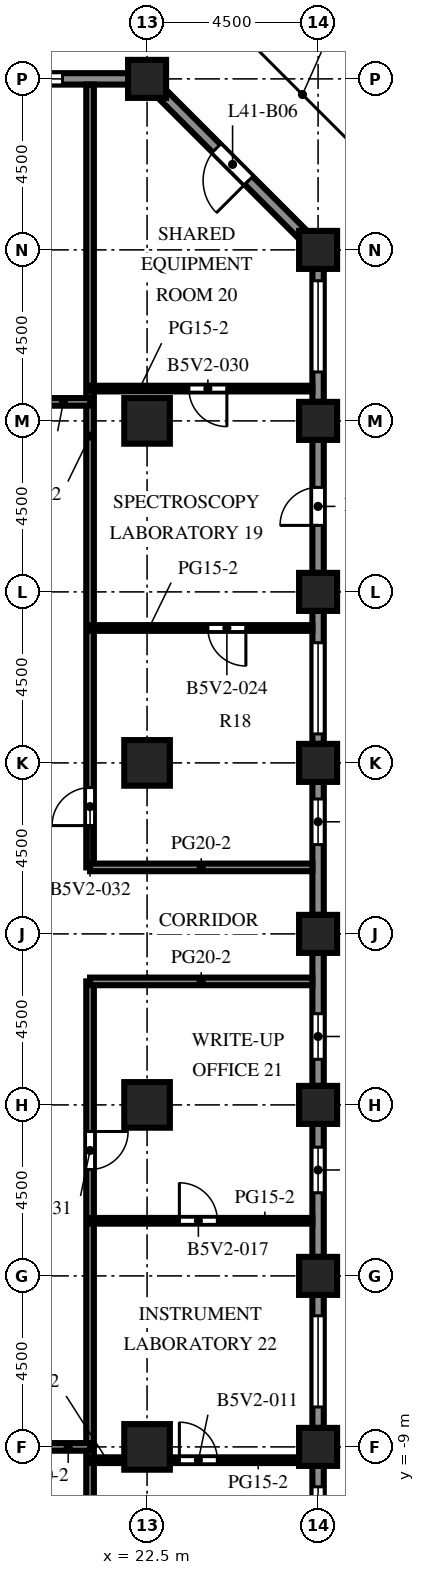
"""IFC4 building model, lengths in metres.
Left out: names, types, materials, properties, quantities, classifications, styles, units other than length and angle.
Written with IfcOpenShell. Run it as: python <this file> out.ifc"""

import sys

from ifc_helpers import new_model, si_unit, direction, frame, frame_2d, origin, origin_2d, place, context, subcontext, project, spatial, rectangle, extrude, element, fill, save


model = new_model("IFC4")
c1 = context("Model", 3, precision=1e-05, world=origin(), true_north=direction((0.0, 1.0)))
c2 = subcontext(c1, "Body", "Model", "MODEL_VIEW")
j1 = project(units=[si_unit("LENGTHUNIT", "METRE"), si_unit("PLANEANGLEUNIT", "RADIAN")], contexts=[c1])
p1 = place(None, origin())
s1 = spatial("IfcSite", under=j1, at=p1, CompositionType="ELEMENT")
p2 = place(p1, origin())
s2 = spatial("IfcBuilding", under=s1, at=p2, CompositionType="ELEMENT")
p3 = place(p2, frame((0.0, 0.0, 181.4)))
s3 = spatial("IfcBuildingStorey", under=s2, at=p3, CompositionType="ELEMENT", Elevation=181.4)
for number, where, z_axis, x_axis in (
    (1, (22.5, 27.0, 0.0), (0.0, 0.0, 1.0), (1.0, 0.0, 0.0)),
    (2, (27.0, -9.0, 0.0), (0.0, 0.0, 1.0), (1.0, 0.0, 0.0)),
    (3, (27.0, -4.5, 0.0), (0.0, 0.0, 1.0), (1.0, 0.0, 0.0)),
    (4, (27.0, 0.0, 0.0), (0.0, 0.0, 1.0), (1.0, 0.0, 0.0)),
    (5, (27.0, 4.5, 0.0), (0.0, 0.0, 1.0), (1.0, 0.0, 0.0)),
    (6, (27.0, 9.0, 0.0), (0.0, 0.0, 1.0), (1.0, 0.0, 0.0)),
    (7, (27.0, 13.5, 0.0), (0.0, 0.0, 1.0), (1.0, 0.0, 0.0)),
    (8, (27.0, 18.0, 0.0), (0.0, 0.0, 1.0), (1.0, 0.0, 0.0)),
    (9, (27.0, 22.5, 0.0), (0.0, 0.0, 1.0), (1.0, 0.0, 0.0)),
):
    element("IfcColumn", number, at=place(p3, frame(where, z_axis=z_axis, x_axis=x_axis)), inside=s3, PredefinedType="COLUMN", context=c2, shape_type="SweptSolid", body=[
        extrude(rectangle(XDim=1.0, YDim=1.0, at=origin_2d()), origin(), (0.0, 0.0, 1.0), 4.1),
    ])
for number, where, z_axis, x_axis in (
    (10, (22.5, -9.0, 0.0), (0.0, 0.0, 1.0), (1.0, 0.0, 0.0)),
    (11, (22.5, 0.0, 0.0), (0.0, 0.0, 1.0), (1.0, 0.0, 0.0)),
    (12, (22.5, 9.0, 0.0), (0.0, 0.0, 1.0), (1.0, 0.0, 0.0)),
    (13, (22.5, 18.0, 0.0), (0.0, 0.0, 1.0), (1.0, 0.0, 0.0)),
):
    element("IfcColumn", number, at=place(p3, frame(where, z_axis=z_axis, x_axis=x_axis)), inside=s3, PredefinedType="COLUMN", context=c2, shape_type="SweptSolid", body=[
        extrude(rectangle(XDim=1.2, YDim=1.2, at=origin_2d()), origin(), (0.0, 0.0, 1.0), 4.1),
    ])
p4 = place(p3, frame((27.0, -9.5, 0.0), z_axis=(0.0, 0.0, 1.0), x_axis=(0.0, -1.0, 0.0)))
e14 = element("IfcWall", 14, at=p4, inside=s3, PredefinedType="SOLIDWALL", context=c2, shape_type="SweptSolid", body=[
    extrude(rectangle(XDim=3.5, YDim=0.3, at=frame_2d((1.75, 0.0))), origin(), (0.0, 0.0, 1.0), 2.7),
])
p5 = place(p4, frame((0.55, 0.0, 0.8)))
e15 = element("IfcOpeningElement", 15, at=p5, cuts=e14, PredefinedType="OPENING", context=c2, shape_type="SweptSolid", body=[
    extrude(rectangle(XDim=2.4, YDim=1.7, at=frame_2d((1.2, 0.85))), frame((0.0, 0.16, 0.0), z_axis=(0.0, -1.0, 0.0), x_axis=(1.0, 0.0, 0.0)), (0.0, 0.0, 1.0), 0.32),
])
p6 = place(p3, frame((27.0, -5.0, 0.0), z_axis=(0.0, 0.0, 1.0), x_axis=(0.0, -1.0, 0.0)))
e16 = element("IfcWall", 16, at=p6, inside=s3, PredefinedType="SOLIDWALL", context=c2, shape_type="SweptSolid", body=[
    extrude(rectangle(XDim=3.5, YDim=0.3, at=frame_2d((1.75, 0.0))), origin(), (0.0, 0.0, 1.0), 2.7),
])
p7 = place(p6, frame((0.55, 0.0, 0.8)))
e17 = element("IfcOpeningElement", 17, at=p7, cuts=e16, PredefinedType="OPENING", context=c2, shape_type="SweptSolid", body=[
    extrude(rectangle(XDim=2.4, YDim=1.7, at=frame_2d((1.2, 0.85))), frame((0.0, 0.16, 0.0), z_axis=(0.0, -1.0, 0.0), x_axis=(1.0, 0.0, 0.0)), (0.0, 0.0, 1.0), 0.32),
])
p8 = place(p3, frame((27.0, -0.5, 0.0), z_axis=(0.0, 0.0, 1.0), x_axis=(0.0, -1.0, 0.0)))
e18 = element("IfcWall", 18, at=p8, inside=s3, PredefinedType="SOLIDWALL", context=c2, shape_type="SweptSolid", body=[
    extrude(rectangle(XDim=3.5, YDim=0.3, at=frame_2d((1.75, 0.0))), origin(), (0.0, 0.0, 1.0), 2.7),
])
p9 = place(p8, frame((0.613, 0.0, 0.8)))
e19 = element("IfcOpeningElement", 19, at=p9, cuts=e18, PredefinedType="OPENING", context=c2, shape_type="SweptSolid", body=[
    extrude(rectangle(XDim=1.2, YDim=1.7, at=frame_2d((0.6, 0.85))), frame((0.0, 0.16, 0.0), z_axis=(0.0, -1.0, 0.0), x_axis=(1.0, 0.0, 0.0)), (0.0, 0.0, 1.0), 0.32),
])
p10 = place(p3, frame((27.0, 4.0, 0.0), z_axis=(0.0, 0.0, 1.0), x_axis=(0.0, -1.0, 0.0)))
e20 = element("IfcWall", 20, at=p10, inside=s3, PredefinedType="SOLIDWALL", context=c2, shape_type="SweptSolid", body=[
    extrude(rectangle(XDim=3.5, YDim=0.3, at=frame_2d((1.75, 0.0))), origin(), (0.0, 0.0, 1.0), 2.7),
])
p11 = place(p10, frame((1.6, 0.0, 0.8)))
e21 = element("IfcOpeningElement", 21, at=p11, cuts=e20, PredefinedType="OPENING", context=c2, shape_type="SweptSolid", body=[
    extrude(rectangle(XDim=1.2, YDim=1.7, at=frame_2d((0.6, 0.85))), frame((0.0, 0.16, 0.0), z_axis=(0.0, -1.0, 0.0), x_axis=(1.0, 0.0, 0.0)), (0.0, 0.0, 1.0), 0.32),
])
p12 = place(p3, frame((27.0, 8.5, 0.0), z_axis=(0.0, 0.0, 1.0), x_axis=(0.0, -1.0, 0.0)))
e22 = element("IfcWall", 22, at=p12, inside=s3, PredefinedType="SOLIDWALL", context=c2, shape_type="SweptSolid", body=[
    extrude(rectangle(XDim=3.5, YDim=0.3, at=frame_2d((1.75, 0.0))), origin(), (0.0, 0.0, 1.0), 2.7),
])
p13 = place(p12, frame((0.45, 0.0, 0.8)))
e23 = element("IfcOpeningElement", 23, at=p13, cuts=e22, PredefinedType="OPENING", context=c2, shape_type="SweptSolid", body=[
    extrude(rectangle(XDim=1.2, YDim=1.7, at=frame_2d((0.6, 0.85))), frame((0.0, 0.16, 0.0), z_axis=(0.0, -1.0, 0.0), x_axis=(1.0, 0.0, 0.0)), (0.0, 0.0, 1.0), 0.32),
])
p14 = place(p3, frame((27.0, 13.0, 0.0), z_axis=(0.0, 0.0, 1.0), x_axis=(0.0, -1.0, 0.0)))
e24 = element("IfcWall", 24, at=p14, inside=s3, PredefinedType="SOLIDWALL", context=c2, shape_type="SweptSolid", body=[
    extrude(rectangle(XDim=3.5, YDim=0.3, at=frame_2d((1.75, 0.0))), origin(), (0.0, 0.0, 1.0), 2.7),
])
p15 = place(p14, frame((0.837, 0.0, 0.8)))
e25 = element("IfcOpeningElement", 25, at=p15, cuts=e24, PredefinedType="OPENING", context=c2, shape_type="SweptSolid", body=[
    extrude(rectangle(XDim=2.4, YDim=1.7, at=frame_2d((1.2, 0.85))), frame((0.0, 0.16, 0.0), z_axis=(0.0, -1.0, 0.0), x_axis=(1.0, 0.0, 0.0)), (0.0, 0.0, 1.0), 0.32),
])
p16 = place(p3, frame((27.0, 17.5, 0.0), z_axis=(0.0, 0.0, 1.0), x_axis=(0.0, -1.0, 0.0)))
e26 = element("IfcWall", 26, at=p16, inside=s3, PredefinedType="SOLIDWALL", context=c2, shape_type="SweptSolid", body=[
    extrude(rectangle(XDim=3.5, YDim=0.3, at=frame_2d((1.75, 0.0))), origin(), (0.0, 0.0, 1.0), 2.7),
])
p17 = place(p16, frame((1.25, 0.0, 0.0)))
e27 = element("IfcOpeningElement", 27, at=p17, cuts=e26, PredefinedType="OPENING", context=c2, shape_type="SweptSolid", body=[
    extrude(rectangle(XDim=1.0, YDim=2.2, at=frame_2d((0.5, 1.1))), frame((0.0, 0.16, 0.0), z_axis=(0.0, -1.0, 0.0), x_axis=(1.0, 0.0, 0.0)), (0.0, 0.0, 1.0), 0.32),
])
p18 = place(p3, frame((27.0, 22.0, 0.0), z_axis=(0.0, 0.0, 1.0), x_axis=(0.0, -1.0, 0.0)))
e28 = element("IfcWall", 28, at=p18, inside=s3, PredefinedType="SOLIDWALL", context=c2, shape_type="SweptSolid", body=[
    extrude(rectangle(XDim=3.5, YDim=0.3, at=frame_2d((1.75, 0.0))), origin(), (0.0, 0.0, 1.0), 2.7),
])
p19 = place(p18, frame((0.312, 0.0, 0.8)))
e29 = element("IfcOpeningElement", 29, at=p19, cuts=e28, PredefinedType="OPENING", context=c2, shape_type="SweptSolid", body=[
    extrude(rectangle(XDim=2.4, YDim=1.7, at=frame_2d((1.2, 0.85))), frame((0.0, 0.16, 0.0), z_axis=(0.0, -1.0, 0.0), x_axis=(1.0, 0.0, 0.0)), (0.0, 0.0, 1.0), 0.32),
])
p20 = place(p3, frame((22.894, 26.606, 0.0), z_axis=(0.0, 0.0, 1.0), x_axis=(0.707106781187, -0.707106781187, 0.0)))
e30 = element("IfcWall", 30, at=p20, inside=s3, PredefinedType="SOLIDWALL", context=c2, shape_type="SweptSolid", body=[
    extrude(rectangle(XDim=5.25, YDim=0.3, at=frame_2d((2.625, 0.0))), origin(), (0.0, 0.0, 1.0), 2.7),
])
p21 = place(p20, frame((2.025, 0.0, 0.0)))
e31 = element("IfcOpeningElement", 31, at=p21, cuts=e30, PredefinedType="OPENING", context=c2, shape_type="SweptSolid", body=[
    extrude(rectangle(XDim=1.2, YDim=2.2, at=frame_2d((0.6, 1.1))), frame((0.0, 0.16, 0.0), z_axis=(0.0, -1.0, 0.0), x_axis=(1.0, 0.0, 0.0)), (0.0, 0.0, 1.0), 0.32),
])
p22 = place(p3, frame((18.5, 27.0, 0.0), z_axis=(0.0, 0.0, 1.0), x_axis=(1.0, 0.0, 0.0)))
e32 = element("IfcWall", 32, at=p22, inside=s3, PredefinedType="SOLIDWALL", context=c2, shape_type="SweptSolid", body=[
    extrude(rectangle(XDim=3.5, YDim=0.3, at=frame_2d((1.75, 0.0))), origin(), (0.0, 0.0, 1.0), 2.7),
])
p23 = place(p22, frame((0.575, 0.0, 0.8)))
e33 = element("IfcOpeningElement", 33, at=p23, cuts=e32, PredefinedType="OPENING", context=c2, shape_type="SweptSolid", body=[
    extrude(rectangle(XDim=1.2, YDim=1.7, at=frame_2d((0.6, 0.85))), frame((0.0, 0.16, 0.0), z_axis=(0.0, -1.0, 0.0), x_axis=(1.0, 0.0, 0.0)), (0.0, 0.0, 1.0), 0.32),
])
p24 = place(p3, frame((21.0, 3.25, 0.0), z_axis=(0.0, 0.0, 1.0), x_axis=(0.0, -1.0, 0.0)))
e34 = element("IfcWall", 34, at=p24, inside=s3, PredefinedType="PARTITIONING", context=c2, shape_type="SweptSolid", body=[
    extrude(rectangle(XDim=30.1, YDim=0.2, at=frame_2d((15.05, 0.0))), origin(), (0.0, 0.0, 1.0), 3.5),
])
p25 = place(p24, frame((3.95, 0.0, 0.0)))
e35 = element("IfcOpeningElement", 35, at=p25, cuts=e34, PredefinedType="OPENING", context=c2, shape_type="SweptSolid", body=[
    extrude(rectangle(XDim=1.0, YDim=2.1, at=frame_2d((0.5, 1.05))), frame((0.0, 0.11, 0.0), z_axis=(0.0, -1.0, 0.0), x_axis=(1.0, 0.0, 0.0)), (0.0, 0.0, 1.0), 0.22),
])
p26 = place(p3, frame((21.0, 26.85, 0.0), z_axis=(0.0, 0.0, 1.0), x_axis=(0.0, -1.0, 0.0)))
e36 = element("IfcWall", 36, at=p26, inside=s3, PredefinedType="PARTITIONING", context=c2, shape_type="SweptSolid", body=[
    extrude(rectangle(XDim=20.6, YDim=0.2, at=frame_2d((10.3, 0.0))), origin(), (0.0, 0.0, 1.0), 3.5),
])
p27 = place(p26, frame((18.5, 0.0, 0.0)))
e37 = element("IfcOpeningElement", 37, at=p27, cuts=e36, PredefinedType="OPENING", context=c2, shape_type="SweptSolid", body=[
    extrude(rectangle(XDim=1.0, YDim=2.1, at=frame_2d((0.5, 1.05))), frame((0.0, 0.11, 0.0), z_axis=(0.0, -1.0, 0.0), x_axis=(1.0, 0.0, 0.0)), (0.0, 0.0, 1.0), 0.22),
])
p28 = place(p3, frame((21.0, -9.35, 0.0), z_axis=(0.0, 0.0, 1.0), x_axis=(1.0, 0.0, 0.0)))
e38 = element("IfcWall", 38, at=p28, inside=s3, PredefinedType="PARTITIONING", context=c2, shape_type="SweptSolid", body=[
    extrude(rectangle(XDim=0.9, YDim=0.15, at=frame_2d((0.45, 0.0))), origin(), (0.0, 0.0, 1.0), 3.5),
])
p29 = place(p3, frame((26.5, -9.35, 0.0), z_axis=(0.0, 0.0, 1.0), x_axis=(-1.0, 0.0, 0.0)))
e39 = element("IfcWall", 39, at=p29, inside=s3, PredefinedType="PARTITIONING", context=c2, shape_type="SweptSolid", body=[
    extrude(rectangle(XDim=3.4, YDim=0.15, at=frame_2d((1.7, 0.0))), origin(), (0.0, 0.0, 1.0), 3.5),
])
p30 = place(p29, frame((2.15, 0.0, 0.0)))
e40 = element("IfcOpeningElement", 40, at=p30, cuts=e39, PredefinedType="OPENING", context=c2, shape_type="SweptSolid", body=[
    extrude(rectangle(XDim=1.0, YDim=2.1, at=frame_2d((0.5, 1.05))), frame((0.0, 0.085, 0.0), z_axis=(0.0, -1.0, 0.0), x_axis=(1.0, 0.0, 0.0)), (0.0, 0.0, 1.0), 0.17),
])
p31 = place(p3, frame((21.0, -9.0, 0.0), z_axis=(0.0, 0.0, 1.0), x_axis=(-1.0, 0.0, 0.0)))
e41 = element("IfcWall", 41, at=p31, inside=s3, PredefinedType="PARTITIONING", context=c2, shape_type="SweptSolid", body=[
    extrude(rectangle(XDim=3.0, YDim=0.2, at=frame_2d((1.5, 0.0))), origin(), (0.0, 0.0, 1.0), 3.5),
])
p32 = place(p31, frame((1.15, 0.0, 0.0)))
e42 = element("IfcOpeningElement", 42, at=p32, cuts=e41, PredefinedType="OPENING", context=c2, shape_type="SweptSolid", body=[
    extrude(rectangle(XDim=1.0, YDim=2.1, at=frame_2d((0.5, 1.05))), frame((0.0, 0.11, 0.0), z_axis=(0.0, -1.0, 0.0), x_axis=(1.0, 0.0, 0.0)), (0.0, 0.0, 1.0), 0.22),
])
p33 = place(p3, frame((26.85, -3.05, 0.0), z_axis=(0.0, 0.0, 1.0), x_axis=(-1.0, 0.0, 0.0)))
e43 = element("IfcWall", 43, at=p33, inside=s3, PredefinedType="PARTITIONING", context=c2, shape_type="SweptSolid", body=[
    extrude(rectangle(XDim=5.85, YDim=0.15, at=frame_2d((2.925, 0.0))), origin(), (0.0, 0.0, 1.0), 3.5),
])
p34 = place(p33, frame((2.5, 0.0, 0.0)))
e44 = element("IfcOpeningElement", 44, at=p34, cuts=e43, PredefinedType="OPENING", context=c2, shape_type="SweptSolid", body=[
    extrude(rectangle(XDim=1.0, YDim=2.1, at=frame_2d((0.5, 1.05))), frame((0.0, 0.085, 0.0), z_axis=(0.0, -1.0, 0.0), x_axis=(1.0, 0.0, 0.0)), (0.0, 0.0, 1.0), 0.17),
])
for number, where, z_axis, x_axis in (
    (45, (21.0, 3.25, 0.0), (0.0, 0.0, 1.0), (1.0, 0.0, 0.0)),
    (46, (21.0, 6.25, 0.0), (0.0, 0.0, 1.0), (1.0, 0.0, 0.0)),
):
    element("IfcWall", number, at=place(p3, frame(where, z_axis=z_axis, x_axis=x_axis)), inside=s3, PredefinedType="PARTITIONING", context=c2, shape_type="SweptSolid", body=[
        extrude(rectangle(XDim=5.85, YDim=0.2, at=frame_2d((2.925, 0.0))), origin(), (0.0, 0.0, 1.0), 3.5),
    ])
p35 = place(p3, frame((21.0, 12.55, 0.0), z_axis=(0.0, 0.0, 1.0), x_axis=(1.0, 0.0, 0.0)))
e47 = element("IfcWall", 47, at=p35, inside=s3, PredefinedType="PARTITIONING", context=c2, shape_type="SweptSolid", body=[
    extrude(rectangle(XDim=5.85, YDim=0.15, at=frame_2d((2.925, 0.0))), origin(), (0.0, 0.0, 1.0), 3.5),
])
p36 = place(p35, frame((3.1, 0.0, 0.0)))
e48 = element("IfcOpeningElement", 48, at=p36, cuts=e47, PredefinedType="OPENING", context=c2, shape_type="SweptSolid", body=[
    extrude(rectangle(XDim=1.0, YDim=2.1, at=frame_2d((0.5, 1.05))), frame((0.0, 0.085, 0.0), z_axis=(0.0, -1.0, 0.0), x_axis=(1.0, 0.0, 0.0)), (0.0, 0.0, 1.0), 0.17),
])
p37 = place(p3, frame((18.0, 18.5, 0.0), z_axis=(0.0, 0.0, 1.0), x_axis=(1.0, 0.0, 0.0)))
e49 = element("IfcWall", 49, at=p37, inside=s3, PredefinedType="PARTITIONING", context=c2, shape_type="SweptSolid", body=[
    extrude(rectangle(XDim=3.0, YDim=0.2, at=frame_2d((1.5, 0.0))), origin(), (0.0, 0.0, 1.0), 3.5),
])
p38 = place(p37, frame((0.6, 0.0, 0.0)))
e50 = element("IfcOpeningElement", 50, at=p38, cuts=e49, PredefinedType="OPENING", context=c2, shape_type="SweptSolid", body=[
    extrude(rectangle(XDim=1.0, YDim=2.1, at=frame_2d((0.5, 1.05))), frame((0.0, 0.11, 0.0), z_axis=(0.0, -1.0, 0.0), x_axis=(1.0, 0.0, 0.0)), (0.0, 0.0, 1.0), 0.22),
])
p39 = place(p3, frame((21.0, 18.85, 0.0), z_axis=(0.0, 0.0, 1.0), x_axis=(1.0, 0.0, 0.0)))
e51 = element("IfcWall", 51, at=p39, inside=s3, PredefinedType="PARTITIONING", context=c2, shape_type="SweptSolid", body=[
    extrude(rectangle(XDim=5.85, YDim=0.15, at=frame_2d((2.925, 0.0))), origin(), (0.0, 0.0, 1.0), 3.5),
])
p40 = place(p39, frame((2.6, 0.0, 0.0)))
e52 = element("IfcOpeningElement", 52, at=p40, cuts=e51, PredefinedType="OPENING", context=c2, shape_type="SweptSolid", body=[
    extrude(rectangle(XDim=1.0, YDim=2.1, at=frame_2d((0.5, 1.05))), frame((0.0, 0.085, 0.0), z_axis=(0.0, -1.0, 0.0), x_axis=(1.0, 0.0, 0.0)), (0.0, 0.0, 1.0), 0.17),
])
p41 = place(p5, origin())
e53 = element("IfcWindow", 53, at=p41, inside=s3, PartitioningType="SINGLE_PANEL", PredefinedType="WINDOW", context=c2, shape_type="SweptSolid", body=[
    extrude(rectangle(XDim=2.4, YDim=1.7, at=frame_2d((1.2, 0.85))), frame((0.0, 0.03, 0.0), z_axis=(0.0, -1.0, 0.0), x_axis=(1.0, 0.0, 0.0)), (0.0, 0.0, 1.0), 0.06),
])
fill(e15, e53)
p42 = place(p7, origin())
e54 = element("IfcWindow", 54, at=p42, inside=s3, PartitioningType="SINGLE_PANEL", PredefinedType="WINDOW", context=c2, shape_type="SweptSolid", body=[
    extrude(rectangle(XDim=2.4, YDim=1.7, at=frame_2d((1.2, 0.85))), frame((0.0, 0.03, 0.0), z_axis=(0.0, -1.0, 0.0), x_axis=(1.0, 0.0, 0.0)), (0.0, 0.0, 1.0), 0.06),
])
fill(e17, e54)
p43 = place(p9, origin())
e55 = element("IfcWindow", 55, at=p43, inside=s3, PartitioningType="SINGLE_PANEL", PredefinedType="WINDOW", context=c2, shape_type="SweptSolid", body=[
    extrude(rectangle(XDim=1.2, YDim=1.7, at=frame_2d((0.6, 0.85))), frame((0.0, 0.03, 0.0), z_axis=(0.0, -1.0, 0.0), x_axis=(1.0, 0.0, 0.0)), (0.0, 0.0, 1.0), 0.06),
])
fill(e19, e55)
p44 = place(p11, origin())
e56 = element("IfcWindow", 56, at=p44, inside=s3, PartitioningType="SINGLE_PANEL", PredefinedType="WINDOW", context=c2, shape_type="SweptSolid", body=[
    extrude(rectangle(XDim=1.2, YDim=1.7, at=frame_2d((0.6, 0.85))), frame((0.0, 0.03, 0.0), z_axis=(0.0, -1.0, 0.0), x_axis=(1.0, 0.0, 0.0)), (0.0, 0.0, 1.0), 0.06),
])
fill(e21, e56)
p45 = place(p13, origin())
e57 = element("IfcWindow", 57, at=p45, inside=s3, PartitioningType="SINGLE_PANEL", PredefinedType="WINDOW", context=c2, shape_type="SweptSolid", body=[
    extrude(rectangle(XDim=1.2, YDim=1.7, at=frame_2d((0.6, 0.85))), frame((0.0, 0.03, 0.0), z_axis=(0.0, -1.0, 0.0), x_axis=(1.0, 0.0, 0.0)), (0.0, 0.0, 1.0), 0.06),
])
fill(e23, e57)
p46 = place(p15, origin())
e58 = element("IfcWindow", 58, at=p46, inside=s3, PartitioningType="SINGLE_PANEL", PredefinedType="WINDOW", context=c2, shape_type="SweptSolid", body=[
    extrude(rectangle(XDim=2.4, YDim=1.7, at=frame_2d((1.2, 0.85))), frame((0.0, 0.03, 0.0), z_axis=(0.0, -1.0, 0.0), x_axis=(1.0, 0.0, 0.0)), (0.0, 0.0, 1.0), 0.06),
])
fill(e25, e58)
p47 = place(p17, origin())
e59 = element("IfcDoor", 59, at=p47, inside=s3, OperationType="SINGLE_SWING_RIGHT", PredefinedType="DOOR", context=c2, shape_type="SweptSolid", body=[
    extrude(rectangle(XDim=1.0, YDim=2.2, at=frame_2d((0.5, 1.1))), frame((0.0, 0.025, 0.0), z_axis=(0.0, -1.0, 0.0), x_axis=(1.0, 0.0, 0.0)), (0.0, 0.0, 1.0), 0.05),
])
fill(e27, e59)
p48 = place(p19, origin())
e60 = element("IfcWindow", 60, at=p48, inside=s3, PartitioningType="SINGLE_PANEL", PredefinedType="WINDOW", context=c2, shape_type="SweptSolid", body=[
    extrude(rectangle(XDim=2.4, YDim=1.7, at=frame_2d((1.2, 0.85))), frame((0.0, 0.03, 0.0), z_axis=(0.0, -1.0, 0.0), x_axis=(1.0, 0.0, 0.0)), (0.0, 0.0, 1.0), 0.06),
])
fill(e29, e60)
p49 = place(p21, origin())
e61 = element("IfcDoor", 61, at=p49, inside=s3, OperationType="SINGLE_SWING_RIGHT", PredefinedType="DOOR", context=c2, shape_type="SweptSolid", body=[
    extrude(rectangle(XDim=1.2, YDim=2.2, at=frame_2d((0.6, 1.1))), frame((0.0, 0.025, 0.0), z_axis=(0.0, -1.0, 0.0), x_axis=(1.0, 0.0, 0.0)), (0.0, 0.0, 1.0), 0.05),
])
fill(e31, e61)
p50 = place(p23, origin())
e62 = element("IfcWindow", 62, at=p50, inside=s3, PartitioningType="SINGLE_PANEL", PredefinedType="WINDOW", context=c2, shape_type="SweptSolid", body=[
    extrude(rectangle(XDim=1.2, YDim=1.7, at=frame_2d((0.6, 0.85))), frame((0.0, 0.03, 0.0), z_axis=(0.0, -1.0, 0.0), x_axis=(1.0, 0.0, 0.0)), (0.0, 0.0, 1.0), 0.06),
])
fill(e33, e62)
p51 = place(p30, origin())
e63 = element("IfcDoor", 63, at=p51, inside=s3, OperationType="SINGLE_SWING_RIGHT", PredefinedType="DOOR", context=c2, shape_type="SweptSolid", body=[
    extrude(rectangle(XDim=1.0, YDim=2.1, at=frame_2d((0.5, 1.05))), frame((0.0, 0.025, 0.0), z_axis=(0.0, -1.0, 0.0), x_axis=(1.0, 0.0, 0.0)), (0.0, 0.0, 1.0), 0.05),
])
fill(e40, e63)
p52 = place(p34, origin())
e64 = element("IfcDoor", 64, at=p52, inside=s3, OperationType="SINGLE_SWING_RIGHT", PredefinedType="DOOR", context=c2, shape_type="SweptSolid", body=[
    extrude(rectangle(XDim=1.0, YDim=2.1, at=frame_2d((0.5, 1.05))), frame((0.0, 0.025, 0.0), z_axis=(0.0, -1.0, 0.0), x_axis=(1.0, 0.0, 0.0)), (0.0, 0.0, 1.0), 0.05),
])
fill(e44, e64)
p53 = place(p36, origin())
e65 = element("IfcDoor", 65, at=p53, inside=s3, OperationType="SINGLE_SWING_RIGHT", PredefinedType="DOOR", context=c2, shape_type="SweptSolid", body=[
    extrude(rectangle(XDim=1.0, YDim=2.1, at=frame_2d((0.5, 1.05))), frame((0.0, 0.025, 0.0), z_axis=(0.0, -1.0, 0.0), x_axis=(1.0, 0.0, 0.0)), (0.0, 0.0, 1.0), 0.05),
])
fill(e48, e65)
p54 = place(p40, origin())
e66 = element("IfcDoor", 66, at=p54, inside=s3, OperationType="SINGLE_SWING_RIGHT", PredefinedType="DOOR", context=c2, shape_type="SweptSolid", body=[
    extrude(rectangle(XDim=1.0, YDim=2.1, at=frame_2d((0.5, 1.05))), frame((0.0, 0.025, 0.0), z_axis=(0.0, -1.0, 0.0), x_axis=(1.0, 0.0, 0.0)), (0.0, 0.0, 1.0), 0.05),
])
fill(e52, e66)
p55 = place(p25, origin())
e67 = element("IfcDoor", 67, at=p55, inside=s3, OperationType="SINGLE_SWING_LEFT", PredefinedType="DOOR", context=c2, shape_type="SweptSolid", body=[
    extrude(rectangle(XDim=1.0, YDim=2.1, at=frame_2d((0.5, 1.05))), frame((0.0, 0.025, 0.0), z_axis=(0.0, -1.0, 0.0), x_axis=(1.0, 0.0, 0.0)), (0.0, 0.0, 1.0), 0.05),
])
fill(e35, e67)
p56 = place(p27, origin())
e68 = element("IfcDoor", 68, at=p56, inside=s3, OperationType="SINGLE_SWING_RIGHT", PredefinedType="DOOR", context=c2, shape_type="SweptSolid", body=[
    extrude(rectangle(XDim=1.0, YDim=2.1, at=frame_2d((0.5, 1.05))), frame((0.0, 0.025, 0.0), z_axis=(0.0, -1.0, 0.0), x_axis=(1.0, 0.0, 0.0)), (0.0, 0.0, 1.0), 0.05),
])
fill(e37, e68)
save(model, sys.argv[1])
